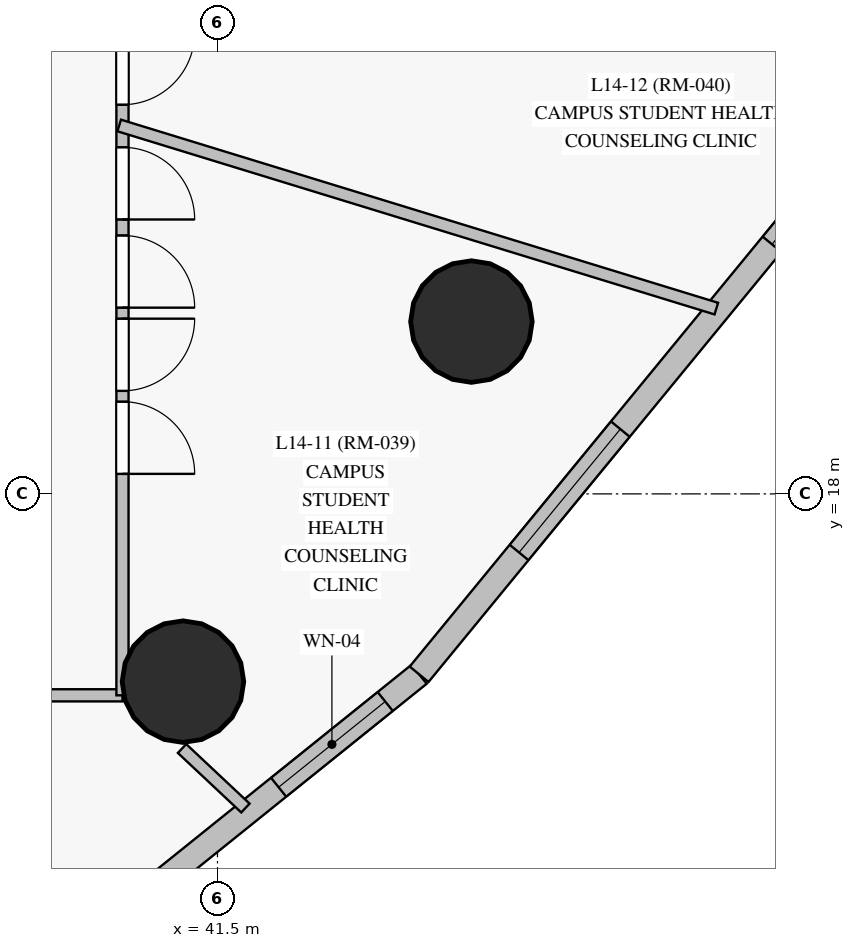
"""IFC4 building model, lengths in metres.
Left out: names, types, materials, properties, quantities, classifications, styles, units other than length and angle.
Written with IfcOpenShell. Run it as: python <this file> out.ifc"""

import sys

from ifc_helpers import new_model, si_unit, direction, frame, frame_2d, origin, origin_with_axes, origin_2d, place, context, subcontext, project, spatial, rectangle, circle, extrude, source, transform, mapped, element, fill, save


model = new_model("IFC4")
c1 = context("Model", 3, precision=1e-05, world=origin(), true_north=direction((0.0, 1.0)))
c2 = subcontext(c1, "Body", "Model", "MODEL_VIEW")
j1 = project(units=[si_unit("LENGTHUNIT", "METRE"), si_unit("PLANEANGLEUNIT", "RADIAN")], contexts=[c1])
p1 = place(None, origin())
s1 = spatial("IfcSite", under=j1, at=p1, CompositionType="ELEMENT")
p2 = place(p1, origin())
s2 = spatial("IfcBuilding", under=s1, at=p2, CompositionType="ELEMENT")
p3 = place(p2, frame((0.0, 0.0, 55.3)))
s3 = spatial("IfcBuildingStorey", under=s2, at=p3, CompositionType="ELEMENT", Elevation=55.3)
m1 = source(origin_with_axes(), c2, "Body", "SweptSolid", [
    extrude(circle(Radius=0.8, at=origin_2d()), origin(), (0.0, 0.0, 1.0), 3.6),
])
for number, where, z_axis, x_axis in (
    (1, (44.841, 20.267, 0.0), (0.0, 0.0, 1.0), (1.0, 0.0, 0.0)),
    (2, (41.046, 15.53, 0.0), (0.0, 0.0, 1.0), (1.0, 0.0, 0.0)),
):
    element("IfcColumn", number, at=place(p3, frame(where, z_axis=z_axis, x_axis=x_axis)), inside=s3, PredefinedType="COLUMN", context=c2, shape_type="MappedRepresentation", body=[
        mapped(m1, transform((0.0, 0.0, 0.0), scale=1.0)),
    ])
p4 = place(p3, frame((35.758, 8.878, 0.0), z_axis=(0.0, 0.0, 1.0), x_axis=(0.779333999584, 0.62660874323, 0.0)))
e3 = element("IfcWall", 3, at=p4, inside=s3, PredefinedType="SOLIDWALL", context=c2, shape_type="SweptSolid", body=[
    extrude(rectangle(XDim=10.771, YDim=0.32, at=frame_2d((5.385, 0.0))), origin(), (0.0, 0.0, 1.0), 3.35),
])
p5 = place(p4, frame((3.815, 0.0, 0.85)))
e4 = element("IfcOpeningElement", 4, at=p5, cuts=e3, PredefinedType="OPENING", context=c2, shape_type="SweptSolid", body=[
    extrude(rectangle(XDim=2.1, YDim=1.95, at=frame_2d((1.05, 0.975))), frame((0.0, 0.17, 0.0), z_axis=(0.0, -1.0, 0.0), x_axis=(1.0, 0.0, 0.0)), (0.0, 0.0, 1.0), 0.34),
])
p6 = place(p4, frame((8.399, 0.0, 0.85)))
e5 = element("IfcOpeningElement", 5, at=p6, cuts=e3, PredefinedType="OPENING", context=c2, shape_type="SweptSolid", body=[
    extrude(rectangle(XDim=1.8, YDim=1.85, at=frame_2d((0.9, 0.925))), frame((0.0, 0.17, 0.0), z_axis=(0.0, -1.0, 0.0), x_axis=(1.0, 0.0, 0.0)), (0.0, 0.0, 1.0), 0.34),
])
p7 = place(p3, frame((44.153, 15.627, 0.0), z_axis=(0.0, 0.0, 1.0), x_axis=(0.634471173576, 0.772946524606, 0.0)))
e6 = element("IfcWall", 6, at=p7, inside=s3, PredefinedType="SOLIDWALL", context=c2, shape_type="SweptSolid", body=[
    extrude(rectangle(XDim=15.49, YDim=0.32, at=frame_2d((7.745, 0.0))), origin(), (0.0, 0.0, 1.0), 3.35),
])
p8 = place(p7, frame((2.073, 0.0, 0.85)))
e7 = element("IfcOpeningElement", 7, at=p8, cuts=e6, PredefinedType="OPENING", context=c2, shape_type="SweptSolid", body=[
    extrude(rectangle(XDim=2.1, YDim=1.95, at=frame_2d((1.05, 0.975))), frame((0.0, 0.17, 0.0), z_axis=(0.0, -1.0, 0.0), x_axis=(1.0, 0.0, 0.0)), (0.0, 0.0, 1.0), 0.34),
])
p9 = place(p7, frame((7.318, 0.0, 0.85)))
e8 = element("IfcOpeningElement", 8, at=p9, cuts=e6, PredefinedType="OPENING", context=c2, shape_type="SweptSolid", body=[
    extrude(rectangle(XDim=2.1, YDim=1.95, at=frame_2d((1.05, 0.975))), frame((0.0, 0.17, 0.0), z_axis=(0.0, -1.0, 0.0), x_axis=(1.0, 0.0, 0.0)), (0.0, 0.0, 1.0), 0.34),
])
p10 = place(p7, frame((11.119, 0.0, 0.85)))
e9 = element("IfcOpeningElement", 9, at=p10, cuts=e6, PredefinedType="OPENING", context=c2, shape_type="SweptSolid", body=[
    extrude(rectangle(XDim=2.1, YDim=1.95, at=frame_2d((1.05, 0.975))), frame((0.0, 0.17, 0.0), z_axis=(0.0, -1.0, 0.0), x_axis=(1.0, 0.0, 0.0)), (0.0, 0.0, 1.0), 0.34),
])
p11 = place(p3, frame((40.25, 15.35, 0.0), z_axis=(0.0, 0.0, 1.0), x_axis=(-1.0, 0.0, 0.0)))
e10 = element("IfcWall", 10, at=p11, inside=s3, PredefinedType="PARTITIONING", context=c2, shape_type="SweptSolid", body=[
    extrude(rectangle(XDim=29.75, YDim=0.16, at=frame_2d((14.875, 0.0))), origin(), (0.0, 0.0, 1.0), 2.7),
])
p12 = place(p11, frame((24.112, 0.0, 0.0)))
e11 = element("IfcOpeningElement", 11, at=p12, cuts=e10, PredefinedType="OPENING", context=c2, shape_type="SweptSolid", body=[
    extrude(rectangle(XDim=0.95, YDim=2.15, at=frame_2d((0.475, 1.075))), frame((0.0, 0.09, 0.0), z_axis=(0.0, -1.0, 0.0), x_axis=(1.0, 0.0, 0.0)), (0.0, 0.0, 1.0), 0.18),
])
p13 = place(p11, frame((21.298, 0.0, 0.0)))
e12 = element("IfcOpeningElement", 12, at=p13, cuts=e10, PredefinedType="OPENING", context=c2, shape_type="SweptSolid", body=[
    extrude(rectangle(XDim=0.95, YDim=2.15, at=frame_2d((0.475, 1.075))), frame((0.0, 0.09, 0.0), z_axis=(0.0, -1.0, 0.0), x_axis=(1.0, 0.0, 0.0)), (0.0, 0.0, 1.0), 0.18),
])
p14 = place(p11, frame((18.323, 0.0, 0.0)))
e13 = element("IfcOpeningElement", 13, at=p14, cuts=e10, PredefinedType="OPENING", context=c2, shape_type="SweptSolid", body=[
    extrude(rectangle(XDim=0.95, YDim=2.15, at=frame_2d((0.475, 1.075))), frame((0.0, 0.09, 0.0), z_axis=(0.0, -1.0, 0.0), x_axis=(1.0, 0.0, 0.0)), (0.0, 0.0, 1.0), 0.18),
])
p15 = place(p11, frame((15.556, 0.0, 0.0)))
e14 = element("IfcOpeningElement", 14, at=p15, cuts=e10, PredefinedType="OPENING", context=c2, shape_type="SweptSolid", body=[
    extrude(rectangle(XDim=0.95, YDim=2.15, at=frame_2d((0.475, 1.075))), frame((0.0, 0.09, 0.0), z_axis=(0.0, -1.0, 0.0), x_axis=(1.0, 0.0, 0.0)), (0.0, 0.0, 1.0), 0.18),
])
p16 = place(p11, frame((13.81, 0.0, 0.0)))
e15 = element("IfcOpeningElement", 15, at=p16, cuts=e10, PredefinedType="OPENING", context=c2, shape_type="SweptSolid", body=[
    extrude(rectangle(XDim=0.95, YDim=2.15, at=frame_2d((0.475, 1.075))), frame((0.0, 0.09, 0.0), z_axis=(0.0, -1.0, 0.0), x_axis=(1.0, 0.0, 0.0)), (0.0, 0.0, 1.0), 0.18),
])
p17 = place(p11, frame((10.377, 0.0, 0.0)))
e16 = element("IfcOpeningElement", 16, at=p17, cuts=e10, PredefinedType="OPENING", context=c2, shape_type="SweptSolid", body=[
    extrude(rectangle(XDim=0.95, YDim=2.15, at=frame_2d((0.475, 1.075))), frame((0.0, 0.09, 0.0), z_axis=(0.0, -1.0, 0.0), x_axis=(1.0, 0.0, 0.0)), (0.0, 0.0, 1.0), 0.18),
])
p18 = place(p11, frame((6.962, 0.0, 0.0)))
e17 = element("IfcOpeningElement", 17, at=p18, cuts=e10, PredefinedType="OPENING", context=c2, shape_type="SweptSolid", body=[
    extrude(rectangle(XDim=0.95, YDim=2.15, at=frame_2d((0.475, 1.075))), frame((0.0, 0.09, 0.0), z_axis=(0.0, -1.0, 0.0), x_axis=(1.0, 0.0, 0.0)), (0.0, 0.0, 1.0), 0.18),
])
p19 = place(p11, frame((2.425, 0.0, 0.0)))
e18 = element("IfcOpeningElement", 18, at=p19, cuts=e10, PredefinedType="OPENING", context=c2, shape_type="SweptSolid", body=[
    extrude(rectangle(XDim=0.95, YDim=2.15, at=frame_2d((0.475, 1.075))), frame((0.0, 0.09, 0.0), z_axis=(0.0, -1.0, 0.0), x_axis=(1.0, 0.0, 0.0)), (0.0, 0.0, 1.0), 0.18),
])
p20 = place(p3, frame((40.25, 37.65, 0.0), z_axis=(0.0, 0.0, 1.0), x_axis=(0.0, -1.0, 0.0)))
e19 = element("IfcWall", 19, at=p20, inside=s3, PredefinedType="PARTITIONING", context=c2, shape_type="SweptSolid", body=[
    extrude(rectangle(XDim=22.3, YDim=0.16, at=frame_2d((11.15, 0.0))), origin(), (0.0, 0.0, 1.0), 2.75),
])
p21 = place(p20, frame((16.25, 0.0, 0.0)))
e20 = element("IfcOpeningElement", 20, at=p21, cuts=e19, PredefinedType="OPENING", context=c2, shape_type="SweptSolid", body=[
    extrude(rectangle(XDim=0.95, YDim=2.15, at=frame_2d((0.475, 1.075))), frame((0.0, 0.09, 0.0), z_axis=(0.0, -1.0, 0.0), x_axis=(1.0, 0.0, 0.0)), (0.0, 0.0, 1.0), 0.18),
])
p22 = place(p20, frame((13.58, 0.0, 0.0)))
e21 = element("IfcOpeningElement", 21, at=p22, cuts=e19, PredefinedType="OPENING", context=c2, shape_type="SweptSolid", body=[
    extrude(rectangle(XDim=0.95, YDim=2.15, at=frame_2d((0.475, 1.075))), frame((0.0, 0.09, 0.0), z_axis=(0.0, -1.0, 0.0), x_axis=(1.0, 0.0, 0.0)), (0.0, 0.0, 1.0), 0.18),
])
p23 = place(p20, frame((10.151, 0.0, 0.0)))
e22 = element("IfcOpeningElement", 22, at=p23, cuts=e19, PredefinedType="OPENING", context=c2, shape_type="SweptSolid", body=[
    extrude(rectangle(XDim=0.86, YDim=2.1, at=frame_2d((0.43, 1.05))), frame((0.0, 0.09, 0.0), z_axis=(0.0, -1.0, 0.0), x_axis=(1.0, 0.0, 0.0)), (0.0, 0.0, 1.0), 0.18),
])
p24 = place(p20, frame((8.711, 0.0, 0.0)))
e23 = element("IfcOpeningElement", 23, at=p24, cuts=e19, PredefinedType="OPENING", context=c2, shape_type="SweptSolid", body=[
    extrude(rectangle(XDim=0.86, YDim=2.1, at=frame_2d((0.43, 1.05))), frame((0.0, 0.09, 0.0), z_axis=(0.0, -1.0, 0.0), x_axis=(1.0, 0.0, 0.0)), (0.0, 0.0, 1.0), 0.18),
])
p25 = place(p20, frame((3.39, 0.0, 0.0)))
e24 = element("IfcOpeningElement", 24, at=p25, cuts=e19, PredefinedType="OPENING", context=c2, shape_type="SweptSolid", body=[
    extrude(rectangle(XDim=0.95, YDim=2.15, at=frame_2d((0.475, 1.075))), frame((0.0, 0.09, 0.0), z_axis=(0.0, -1.0, 0.0), x_axis=(1.0, 0.0, 0.0)), (0.0, 0.0, 1.0), 0.18),
])
p26 = place(p20, frame((0.759, 0.0, 0.0)))
e25 = element("IfcOpeningElement", 25, at=p26, cuts=e19, PredefinedType="OPENING", context=c2, shape_type="SweptSolid", body=[
    extrude(rectangle(XDim=0.86, YDim=2.1, at=frame_2d((0.43, 1.05))), frame((0.0, 0.09, 0.0), z_axis=(0.0, -1.0, 0.0), x_axis=(1.0, 0.0, 0.0)), (0.0, 0.0, 1.0), 0.18),
])
p27 = place(p20, frame((15.09, 0.0, 0.0)))
e26 = element("IfcOpeningElement", 26, at=p27, cuts=e19, PredefinedType="OPENING", context=c2, shape_type="SweptSolid", body=[
    extrude(rectangle(XDim=0.95, YDim=2.15, at=frame_2d((0.475, 1.075))), frame((0.0, 0.09, 0.0), z_axis=(0.0, -1.0, 0.0), x_axis=(1.0, 0.0, 0.0)), (0.0, 0.0, 1.0), 0.18),
])
p28 = place(p20, frame((17.345, 0.0, 0.0)))
e27 = element("IfcOpeningElement", 27, at=p28, cuts=e19, PredefinedType="OPENING", context=c2, shape_type="SweptSolid", body=[
    extrude(rectangle(XDim=0.95, YDim=2.15, at=frame_2d((0.475, 1.075))), frame((0.0, 0.09, 0.0), z_axis=(0.0, -1.0, 0.0), x_axis=(1.0, 0.0, 0.0)), (0.0, 0.0, 1.0), 0.18),
])
p29 = place(p20, frame((18.437, 0.0, 0.0)))
e28 = element("IfcOpeningElement", 28, at=p29, cuts=e19, PredefinedType="OPENING", context=c2, shape_type="SweptSolid", body=[
    extrude(rectangle(XDim=0.95, YDim=2.15, at=frame_2d((0.475, 1.075))), frame((0.0, 0.09, 0.0), z_axis=(0.0, -1.0, 0.0), x_axis=(1.0, 0.0, 0.0)), (0.0, 0.0, 1.0), 0.18),
])
p30 = place(p20, frame((6.529, 0.0, 0.0)))
e29 = element("IfcOpeningElement", 29, at=p30, cuts=e19, PredefinedType="OPENING", context=c2, shape_type="SweptSolid", body=[
    extrude(rectangle(XDim=0.86, YDim=2.04, at=frame_2d((0.43, 1.02))), frame((0.0, 0.09, 0.0), z_axis=(0.0, -1.0, 0.0), x_axis=(1.0, 0.0, 0.0)), (0.0, 0.0, 1.0), 0.18),
])
p31 = place(p3, frame((40.22, 25.064, 0.0), z_axis=(0.0, 0.0, 1.0), x_axis=(0.993179898744, -0.116591975412, 0.0)))
e30 = element("IfcWall", 30, at=p31, inside=s3, PredefinedType="PARTITIONING", context=c2, shape_type="SweptSolid", body=[
    extrude(rectangle(XDim=10.683, YDim=0.16, at=frame_2d((5.342, 0.0))), origin(), (0.0, 0.0, 1.0), 3.35),
])
p32 = place(p3, frame((40.207, 22.847, 0.0), z_axis=(0.0, 0.0, 1.0), x_axis=(0.956045213293, -0.293219286779, 0.0)))
e31 = element("IfcWall", 31, at=p32, inside=s3, PredefinedType="PARTITIONING", context=c2, shape_type="SweptSolid", body=[
    extrude(rectangle(XDim=8.217, YDim=0.16, at=frame_2d((4.108, 0.0))), origin(), (0.0, 0.0, 1.0), 3.35),
])
p33 = place(p3, frame((41.034, 14.65, 0.0), z_axis=(0.0, 0.0, 1.0), x_axis=(0.729064336352, -0.68444517199, 0.0)))
e32 = element("IfcWall", 32, at=p33, inside=s3, PredefinedType="PARTITIONING", context=c2, shape_type="SweptSolid", body=[
    extrude(rectangle(XDim=1.144, YDim=0.16, at=frame_2d((0.572, 0.0))), origin(), (0.0, 0.0, 1.0), 3.35),
])
m2 = source(origin_with_axes(), c2, "Body", "SweptSolid", [
    extrude(rectangle(XDim=1.8, YDim=1.85, at=frame_2d((0.9, 0.925))), frame((0.0, 0.03, 0.0), z_axis=(0.0, -1.0, 0.0), x_axis=(1.0, 0.0, 0.0)), (0.0, 0.0, 1.0), 0.06),
])
p34 = place(p6, origin())
e33 = element("IfcWindow", 33, at=p34, inside=s3, PartitioningType="SINGLE_PANEL", PredefinedType="WINDOW", context=c2, shape_type="MappedRepresentation", body=[
    mapped(m2, transform((0.0, 0.0, 0.0), scale=1.0)),
])
fill(e5, e33)
m3 = source(origin_with_axes(), c2, "Body", "SweptSolid", [
    extrude(rectangle(XDim=2.1, YDim=1.95, at=frame_2d((1.05, 0.975))), frame((0.0, 0.03, 0.0), z_axis=(0.0, -1.0, 0.0), x_axis=(1.0, 0.0, 0.0)), (0.0, 0.0, 1.0), 0.06),
])
p35 = place(p8, origin())
e34 = element("IfcWindow", 34, at=p35, inside=s3, PartitioningType="SINGLE_PANEL", PredefinedType="WINDOW", context=c2, shape_type="MappedRepresentation", body=[
    mapped(m3, transform((0.0, 0.0, 0.0), scale=1.0)),
])
fill(e7, e34)
p36 = place(p9, origin())
e35 = element("IfcWindow", 35, at=p36, inside=s3, PartitioningType="SINGLE_PANEL", PredefinedType="WINDOW", context=c2, shape_type="MappedRepresentation", body=[
    mapped(m3, transform((0.0, 0.0, 0.0), scale=1.0)),
])
fill(e8, e35)
m4 = source(origin_with_axes(), c2, "Body", "SweptSolid", [
    extrude(rectangle(XDim=0.95, YDim=2.15, at=frame_2d((0.475, 1.075))), frame((0.0, 0.025, 0.0), z_axis=(0.0, -1.0, 0.0), x_axis=(1.0, 0.0, 0.0)), (0.0, 0.0, 1.0), 0.05),
])
p37 = place(p21, origin())
e36 = element("IfcDoor", 36, at=p37, inside=s3, OperationType="SINGLE_SWING_RIGHT", PredefinedType="DOOR", context=c2, shape_type="MappedRepresentation", body=[
    mapped(m4, transform((0.0, 0.0, 0.0), scale=1.0)),
])
fill(e20, e36)
p38 = place(p22, origin())
e37 = element("IfcDoor", 37, at=p38, inside=s3, OperationType="SINGLE_SWING_LEFT", PredefinedType="DOOR", context=c2, shape_type="MappedRepresentation", body=[
    mapped(m4, transform((0.0, 0.0, 0.0), scale=1.0)),
])
fill(e21, e37)
p39 = place(p27, origin())
e38 = element("IfcDoor", 38, at=p39, inside=s3, OperationType="SINGLE_SWING_RIGHT", PredefinedType="DOOR", context=c2, shape_type="MappedRepresentation", body=[
    mapped(m4, transform((0.0, 0.0, 0.0), scale=1.0)),
])
fill(e26, e38)
p40 = place(p28, origin())
e39 = element("IfcDoor", 39, at=p40, inside=s3, OperationType="SINGLE_SWING_LEFT", PredefinedType="DOOR", context=c2, shape_type="MappedRepresentation", body=[
    mapped(m4, transform((0.0, 0.0, 0.0), scale=1.0)),
])
fill(e27, e39)
p41 = place(p29, origin())
e40 = element("IfcDoor", 40, at=p41, inside=s3, OperationType="SINGLE_SWING_RIGHT", PredefinedType="DOOR", context=c2, shape_type="MappedRepresentation", body=[
    mapped(m4, transform((0.0, 0.0, 0.0), scale=1.0)),
])
fill(e28, e40)
save(model, sys.argv[1])
